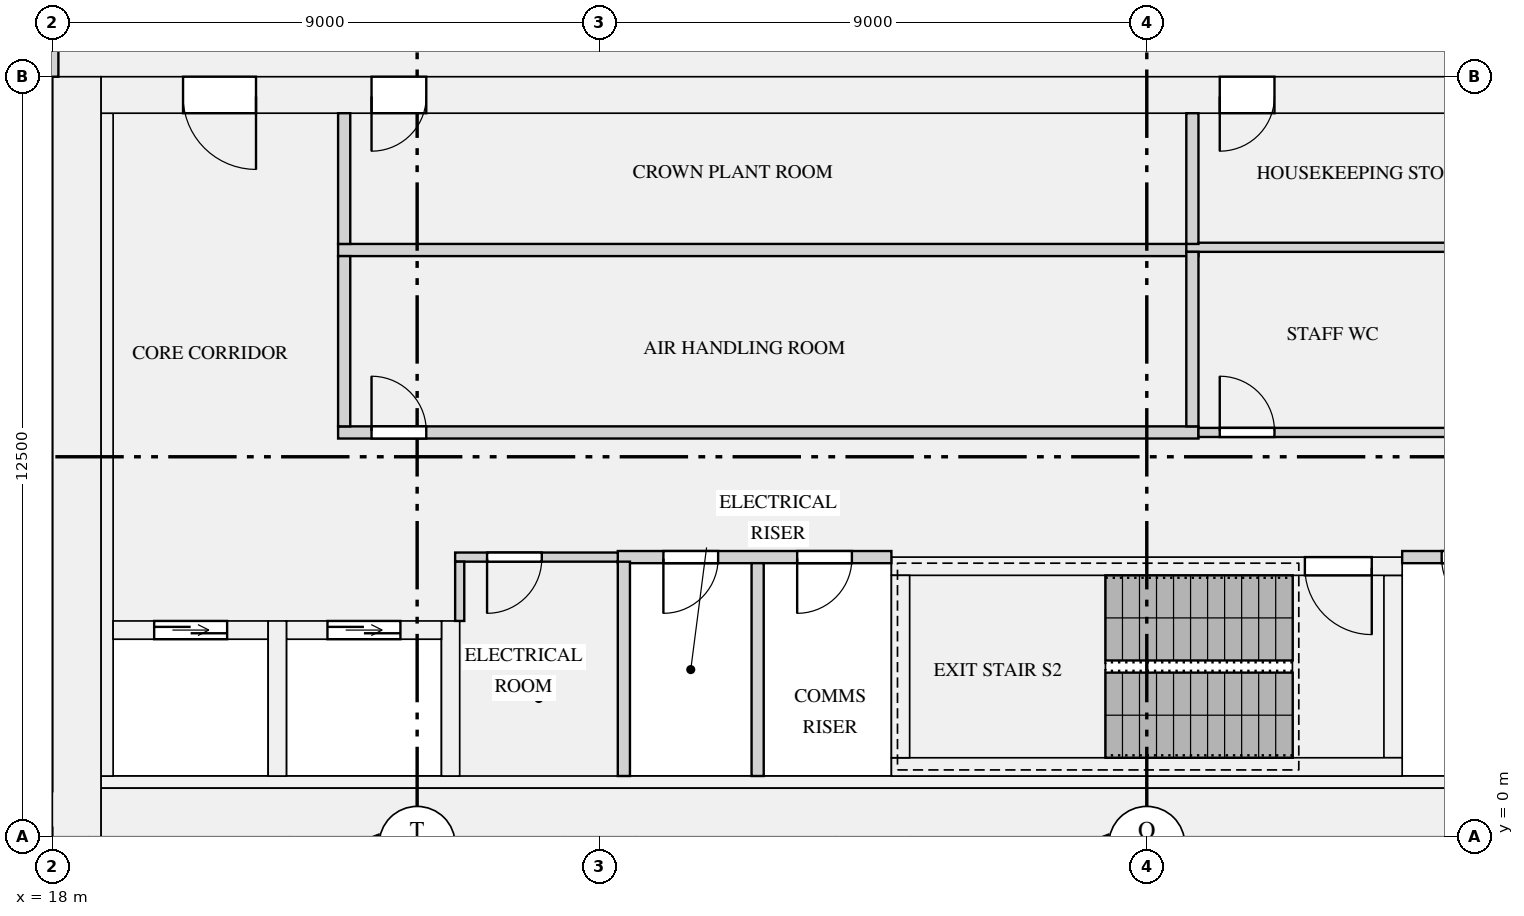
"""IFC4 building model, lengths in metres.
Left out: names, types, materials, properties, quantities, classifications, styles, units other than length and angle.
Written with IfcOpenShell. Run it as: python <this file> out.ifc"""

import sys

from ifc_helpers import new_model, si_unit, direction, frame, frame_2d, origin, place, context, subcontext, project, spatial, rectangle, extrude, element, fill, save


model = new_model("IFC4")
c1 = context("Model", 3, precision=1e-05, world=origin(), true_north=direction((0.0, 1.0)))
c2 = subcontext(c1, "Body", "Model", "MODEL_VIEW")
j1 = project(units=[si_unit("LENGTHUNIT", "METRE"), si_unit("PLANEANGLEUNIT", "RADIAN")], contexts=[c1])
p1 = place(None, origin())
s1 = spatial("IfcSite", under=j1, at=p1, CompositionType="ELEMENT")
p2 = place(p1, origin())
s2 = spatial("IfcBuilding", under=s1, at=p2, CompositionType="ELEMENT")
p3 = place(p2, frame((0.0, 0.0, 137.1)))
s3 = spatial("IfcBuildingStorey", under=s2, at=p3, CompositionType="ELEMENT", Elevation=137.1)
p4 = place(p3, frame((18.4, 0.0, 0.0), z_axis=(0.0, 0.0, 1.0), x_axis=(0.0, 1.0, 0.0)))
e1 = element("IfcWall", 1, at=p4, inside=s3, PredefinedType="SHEAR", context=c2, shape_type="SweptSolid", body=[
    extrude(rectangle(XDim=12.5, YDim=0.8, at=frame_2d((6.25, 0.0))), origin(), (0.0, 0.0, 1.0), 4.2),
])
p5 = place(p3, frame((18.8, 0.4, 0.0), z_axis=(0.0, 0.0, 1.0), x_axis=(1.0, 0.0, 0.0)))
e2 = element("IfcWall", 2, at=p5, inside=s3, PredefinedType="SHEAR", context=c2, shape_type="SweptSolid", body=[
    extrude(rectangle(XDim=34.4, YDim=0.8, at=frame_2d((17.2, 0.0))), origin(), (0.0, 0.0, 1.0), 4.2),
])
p6 = place(p3, frame((18.8, 12.2, 0.0), z_axis=(0.0, 0.0, 1.0), x_axis=(1.0, 0.0, 0.0)))
e3 = element("IfcWall", 3, at=p6, inside=s3, PredefinedType="SHEAR", context=c2, shape_type="SweptSolid", body=[
    extrude(rectangle(XDim=34.4, YDim=0.6, at=frame_2d((17.2, 0.0))), origin(), (0.0, 0.0, 1.0), 4.2),
])
p7 = place(p6, frame((24.375, 0.0, 0.0)))
e4 = element("IfcOpeningElement", 4, at=p7, cuts=e3, PredefinedType="OPENING", context=c2, shape_type="SweptSolid", body=[
    extrude(rectangle(XDim=1.1, YDim=2.1, at=frame_2d((0.55, 1.05))), frame((0.0, 0.31, 0.0), z_axis=(0.0, -1.0, 0.0), x_axis=(1.0, 0.0, 0.0)), (0.0, 0.0, 1.0), 0.62),
])
p8 = place(p6, frame((26.625, 0.0, 0.0)))
e5 = element("IfcOpeningElement", 5, at=p8, cuts=e3, PredefinedType="OPENING", context=c2, shape_type="SweptSolid", body=[
    extrude(rectangle(XDim=1.1, YDim=2.1, at=frame_2d((0.55, 1.05))), frame((0.0, 0.31, 0.0), z_axis=(0.0, -1.0, 0.0), x_axis=(1.0, 0.0, 0.0)), (0.0, 0.0, 1.0), 0.62),
])
p9 = place(p6, frame((28.875, 0.0, 0.0)))
e6 = element("IfcOpeningElement", 6, at=p9, cuts=e3, PredefinedType="OPENING", context=c2, shape_type="SweptSolid", body=[
    extrude(rectangle(XDim=1.1, YDim=2.1, at=frame_2d((0.55, 1.05))), frame((0.0, 0.31, 0.0), z_axis=(0.0, -1.0, 0.0), x_axis=(1.0, 0.0, 0.0)), (0.0, 0.0, 1.0), 0.62),
])
p10 = place(p6, frame((18.4, 0.0, 0.0)))
e7 = element("IfcOpeningElement", 7, at=p10, cuts=e3, PredefinedType="OPENING", context=c2, shape_type="SweptSolid", body=[
    extrude(rectangle(XDim=0.9, YDim=2.1, at=frame_2d((0.45, 1.05))), frame((0.0, 0.31, 0.0), z_axis=(0.0, -1.0, 0.0), x_axis=(1.0, 0.0, 0.0)), (0.0, 0.0, 1.0), 0.62),
])
p11 = place(p6, frame((4.45, 0.0, 0.0)))
e8 = element("IfcOpeningElement", 8, at=p11, cuts=e3, PredefinedType="OPENING", context=c2, shape_type="SweptSolid", body=[
    extrude(rectangle(XDim=0.9, YDim=2.1, at=frame_2d((0.45, 1.05))), frame((0.0, 0.31, 0.0), z_axis=(0.0, -1.0, 0.0), x_axis=(1.0, 0.0, 0.0)), (0.0, 0.0, 1.0), 0.62),
])
p12 = place(p6, frame((1.35, 0.0, 0.0)))
e9 = element("IfcOpeningElement", 9, at=p12, cuts=e3, PredefinedType="OPENING", context=c2, shape_type="SweptSolid", body=[
    extrude(rectangle(XDim=1.2, YDim=2.1, at=frame_2d((0.6, 1.05))), frame((0.0, 0.31, 0.0), z_axis=(0.0, -1.0, 0.0), x_axis=(1.0, 0.0, 0.0)), (0.0, 0.0, 1.0), 0.62),
])
p13 = place(p6, frame((31.85, 0.0, 0.0)))
e10 = element("IfcOpeningElement", 10, at=p13, cuts=e3, PredefinedType="OPENING", context=c2, shape_type="SweptSolid", body=[
    extrude(rectangle(XDim=1.2, YDim=2.1, at=frame_2d((0.6, 1.05))), frame((0.0, 0.31, 0.0), z_axis=(0.0, -1.0, 0.0), x_axis=(1.0, 0.0, 0.0)), (0.0, 0.0, 1.0), 0.62),
])
p14 = place(p3, frame((18.9, 1.0, 0.0), z_axis=(0.0, 0.0, 1.0), x_axis=(0.0, 1.0, 0.0)))
e11 = element("IfcWall", 11, at=p14, inside=s3, PredefinedType="SHEAR", context=c2, shape_type="SweptSolid", body=[
    extrude(rectangle(XDim=10.9, YDim=0.2, at=frame_2d((5.45, 0.0))), origin(), (0.0, 0.0, 1.0), 4.2),
])
p15 = place(p3, frame((18.8, 0.9, 0.0), z_axis=(0.0, 0.0, 1.0), x_axis=(1.0, 0.0, 0.0)))
e12 = element("IfcWall", 12, at=p15, inside=s3, PredefinedType="SHEAR", context=c2, shape_type="SweptSolid", body=[
    extrude(rectangle(XDim=34.4, YDim=0.2, at=frame_2d((17.2, 0.0))), origin(), (0.0, 0.0, 1.0), 4.2),
])
p16 = place(p3, frame((19.0, 3.4, 0.0), z_axis=(0.0, 0.0, 1.0), x_axis=(1.0, 0.0, 0.0)))
e13 = element("IfcWall", 13, at=p16, inside=s3, PredefinedType="SHEAR", context=c2, shape_type="SweptSolid", body=[
    extrude(rectangle(XDim=2.55, YDim=0.3, at=frame_2d((1.275, 0.0))), origin(), (0.0, 0.0, 1.0), 4.2),
])
p17 = place(p16, frame((0.675, 0.0, 0.0)))
e14 = element("IfcOpeningElement", 14, at=p17, cuts=e13, PredefinedType="OPENING", context=c2, shape_type="SweptSolid", body=[
    extrude(rectangle(XDim=1.2, YDim=2.1, at=frame_2d((0.6, 1.05))), frame((0.0, 0.16, 0.0), z_axis=(0.0, -1.0, 0.0), x_axis=(1.0, 0.0, 0.0)), (0.0, 0.0, 1.0), 0.32),
])
p18 = place(p3, frame((21.85, 3.4, 0.0), z_axis=(0.0, 0.0, 1.0), x_axis=(1.0, 0.0, 0.0)))
e15 = element("IfcWall", 15, at=p18, inside=s3, PredefinedType="SHEAR", context=c2, shape_type="SweptSolid", body=[
    extrude(rectangle(XDim=2.55, YDim=0.3, at=frame_2d((1.275, 0.0))), origin(), (0.0, 0.0, 1.0), 4.2),
])
p19 = place(p18, frame((0.675, 0.0, 0.0)))
e16 = element("IfcOpeningElement", 16, at=p19, cuts=e15, PredefinedType="OPENING", context=c2, shape_type="SweptSolid", body=[
    extrude(rectangle(XDim=1.2, YDim=2.1, at=frame_2d((0.6, 1.05))), frame((0.0, 0.16, 0.0), z_axis=(0.0, -1.0, 0.0), x_axis=(1.0, 0.0, 0.0)), (0.0, 0.0, 1.0), 0.32),
])
for number, where, z_axis, x_axis in (
    (17, (21.7, 1.0, 0.0), (0.0, 0.0, 1.0), (0.0, 1.0, 0.0)),
    (18, (24.55, 1.0, 0.0), (0.0, 0.0, 1.0), (0.0, 1.0, 0.0)),
):
    element("IfcWall", number, at=place(p3, frame(where, z_axis=z_axis, x_axis=x_axis)), inside=s3, PredefinedType="SHEAR", context=c2, shape_type="SweptSolid", body=[
        extrude(rectangle(XDim=2.55, YDim=0.3, at=frame_2d((1.275, 0.0))), origin(), (0.0, 0.0, 1.0), 4.2),
    ])
p20 = place(p3, frame((31.8, 1.15, 0.0), z_axis=(0.0, 0.0, 1.0), x_axis=(1.0, 0.0, 0.0)))
e19 = element("IfcWall", 19, at=p20, inside=s3, PredefinedType="SHEAR", context=c2, shape_type="SweptSolid", body=[
    extrude(rectangle(XDim=8.4, YDim=0.3, at=frame_2d((4.2, 0.0))), origin(), (0.0, 0.0, 1.0), 4.2),
])
p21 = place(p3, frame((31.8, 4.45, 0.0), z_axis=(0.0, 0.0, 1.0), x_axis=(1.0, 0.0, 0.0)))
e20 = element("IfcWall", 20, at=p21, inside=s3, PredefinedType="SHEAR", context=c2, shape_type="SweptSolid", body=[
    extrude(rectangle(XDim=8.4, YDim=0.3, at=frame_2d((4.2, 0.0))), origin(), (0.0, 0.0, 1.0), 4.2),
])
p22 = place(p21, frame((6.8, 0.0, 0.0)))
e21 = element("IfcOpeningElement", 21, at=p22, cuts=e20, PredefinedType="OPENING", context=c2, shape_type="SweptSolid", body=[
    extrude(rectangle(XDim=1.1, YDim=2.1, at=frame_2d((0.55, 1.05))), frame((0.0, 0.16, 0.0), z_axis=(0.0, -1.0, 0.0), x_axis=(1.0, 0.0, 0.0)), (0.0, 0.0, 1.0), 0.32),
])
for number, where, z_axis, x_axis in (
    (22, (31.95, 1.3, 0.0), (0.0, 0.0, 1.0), (0.0, 1.0, 0.0)),
    (23, (40.05, 1.3, 0.0), (0.0, 0.0, 1.0), (0.0, 1.0, 0.0)),
):
    element("IfcWall", number, at=place(p3, frame(where, z_axis=z_axis, x_axis=x_axis)), inside=s3, PredefinedType="SHEAR", context=c2, shape_type="SweptSolid", body=[
        extrude(rectangle(XDim=3.0, YDim=0.3, at=frame_2d((1.5, 0.0))), origin(), (0.0, 0.0, 1.0), 4.2),
    ])
p23 = place(p3, frame((27.3, 4.6, 0.0), z_axis=(0.0, 0.0, 1.0), x_axis=(1.0, 0.0, 0.0)))
e24 = element("IfcWall", 24, at=p23, inside=s3, PredefinedType="PARTITIONING", context=c2, shape_type="SweptSolid", body=[
    extrude(rectangle(XDim=4.5, YDim=0.2, at=frame_2d((2.25, 0.0))), origin(), (0.0, 0.0, 1.0), 3.7),
])
p24 = place(p23, frame((0.75, 0.0, 0.0)))
e25 = element("IfcOpeningElement", 25, at=p24, cuts=e24, PredefinedType="OPENING", context=c2, shape_type="SweptSolid", body=[
    extrude(rectangle(XDim=0.9, YDim=2.1, at=frame_2d((0.45, 1.05))), frame((0.0, 0.11, 0.0), z_axis=(0.0, -1.0, 0.0), x_axis=(1.0, 0.0, 0.0)), (0.0, 0.0, 1.0), 0.22),
])
p25 = place(p23, frame((2.95, 0.0, 0.0)))
e26 = element("IfcOpeningElement", 26, at=p25, cuts=e24, PredefinedType="OPENING", context=c2, shape_type="SweptSolid", body=[
    extrude(rectangle(XDim=0.9, YDim=2.1, at=frame_2d((0.45, 1.05))), frame((0.0, 0.11, 0.0), z_axis=(0.0, -1.0, 0.0), x_axis=(1.0, 0.0, 0.0)), (0.0, 0.0, 1.0), 0.22),
])
p26 = place(p3, frame((40.2, 4.6, 0.0), z_axis=(0.0, 0.0, 1.0), x_axis=(1.0, 0.0, 0.0)))
e27 = element("IfcWall", 27, at=p26, inside=s3, PredefinedType="PARTITIONING", context=c2, shape_type="SweptSolid", body=[
    extrude(rectangle(XDim=4.5, YDim=0.2, at=frame_2d((2.25, 0.0))), origin(), (0.0, 0.0, 1.0), 3.7),
])
p27 = place(p26, frame((0.65, 0.0, 0.0)))
e28 = element("IfcOpeningElement", 28, at=p27, cuts=e27, PredefinedType="OPENING", context=c2, shape_type="SweptSolid", body=[
    extrude(rectangle(XDim=0.9, YDim=2.1, at=frame_2d((0.45, 1.05))), frame((0.0, 0.11, 0.0), z_axis=(0.0, -1.0, 0.0), x_axis=(1.0, 0.0, 0.0)), (0.0, 0.0, 1.0), 0.22),
])
p28 = place(p26, frame((2.85, 0.0, 0.0)))
e29 = element("IfcOpeningElement", 29, at=p28, cuts=e27, PredefinedType="OPENING", context=c2, shape_type="SweptSolid", body=[
    extrude(rectangle(XDim=0.9, YDim=2.1, at=frame_2d((0.45, 1.05))), frame((0.0, 0.11, 0.0), z_axis=(0.0, -1.0, 0.0), x_axis=(1.0, 0.0, 0.0)), (0.0, 0.0, 1.0), 0.22),
])
p29 = place(p3, frame((24.625, 4.6, 0.0), z_axis=(0.0, 0.0, 1.0), x_axis=(1.0, 0.0, 0.0)))
e30 = element("IfcWall", 30, at=p29, inside=s3, PredefinedType="PARTITIONING", context=c2, shape_type="SweptSolid", body=[
    extrude(rectangle(XDim=2.675, YDim=0.15, at=frame_2d((1.337, 0.0))), origin(), (0.0, 0.0, 1.0), 3.7),
])
p30 = place(p29, frame((0.525, 0.0, 0.0)))
e31 = element("IfcOpeningElement", 31, at=p30, cuts=e30, PredefinedType="OPENING", context=c2, shape_type="SweptSolid", body=[
    extrude(rectangle(XDim=0.9, YDim=2.1, at=frame_2d((0.45, 1.05))), frame((0.0, 0.085, 0.0), z_axis=(0.0, -1.0, 0.0), x_axis=(1.0, 0.0, 0.0)), (0.0, 0.0, 1.0), 0.17),
])
p31 = place(p3, frame((22.7, 6.65, 0.0), z_axis=(0.0, 0.0, 1.0), x_axis=(1.0, 0.0, 0.0)))
e32 = element("IfcWall", 32, at=p31, inside=s3, PredefinedType="PARTITIONING", context=c2, shape_type="SweptSolid", body=[
    extrude(rectangle(XDim=14.15, YDim=0.2, at=frame_2d((7.075, 0.0))), origin(), (0.0, 0.0, 1.0), 3.7),
])
p32 = place(p31, frame((0.55, 0.0, 0.0)))
e33 = element("IfcOpeningElement", 33, at=p32, cuts=e32, PredefinedType="OPENING", context=c2, shape_type="SweptSolid", body=[
    extrude(rectangle(XDim=0.9, YDim=2.1, at=frame_2d((0.45, 1.05))), frame((0.0, 0.11, 0.0), z_axis=(0.0, -1.0, 0.0), x_axis=(1.0, 0.0, 0.0)), (0.0, 0.0, 1.0), 0.22),
])
p33 = place(p3, frame((36.85, 6.65, 0.0), z_axis=(0.0, 0.0, 1.0), x_axis=(1.0, 0.0, 0.0)))
e34 = element("IfcWall", 34, at=p33, inside=s3, PredefinedType="PARTITIONING", context=c2, shape_type="SweptSolid", body=[
    extrude(rectangle(XDim=5.675, YDim=0.15, at=frame_2d((2.837, 0.0))), origin(), (0.0, 0.0, 1.0), 3.7),
])
p34 = place(p33, frame((0.35, 0.0, 0.0)))
e35 = element("IfcOpeningElement", 35, at=p34, cuts=e34, PredefinedType="OPENING", context=c2, shape_type="SweptSolid", body=[
    extrude(rectangle(XDim=0.9, YDim=2.1, at=frame_2d((0.45, 1.05))), frame((0.0, 0.085, 0.0), z_axis=(0.0, -1.0, 0.0), x_axis=(1.0, 0.0, 0.0)), (0.0, 0.0, 1.0), 0.17),
])
p35 = place(p3, frame((22.7, 9.65, 0.0), z_axis=(0.0, 0.0, 1.0), x_axis=(1.0, 0.0, 0.0)))
e36 = element("IfcWall", 36, at=p35, inside=s3, PredefinedType="PARTITIONING", context=c2, shape_type="SweptSolid", body=[
    extrude(rectangle(XDim=14.15, YDim=0.2, at=frame_2d((7.075, 0.0))), origin(), (0.0, 0.0, 1.0), 3.7),
])
p36 = place(p3, frame((36.65, 9.695, 0.0), z_axis=(0.0, 0.0, 1.0), x_axis=(1.0, 0.0, 0.0)))
e37 = element("IfcWall", 37, at=p36, inside=s3, PredefinedType="PARTITIONING", context=c2, shape_type="SweptSolid", body=[
    extrude(rectangle(XDim=5.8, YDim=0.15, at=frame_2d((2.9, 0.0))), origin(), (0.0, 0.0, 1.0), 3.7),
])
p37 = place(p3, frame((27.4, 1.0, 0.0), z_axis=(0.0, 0.0, 1.0), x_axis=(0.0, 1.0, 0.0)))
e38 = element("IfcWall", 38, at=p37, inside=s3, PredefinedType="PARTITIONING", context=c2, shape_type="SweptSolid", body=[
    extrude(rectangle(XDim=3.525, YDim=0.2, at=frame_2d((1.762, 0.0))), origin(), (0.0, 0.0, 1.0), 3.7),
])
p38 = place(p3, frame((29.6, 1.0, 0.0), z_axis=(0.0, 0.0, 1.0), x_axis=(0.0, 1.0, 0.0)))
e39 = element("IfcWall", 39, at=p38, inside=s3, PredefinedType="PARTITIONING", context=c2, shape_type="SweptSolid", body=[
    extrude(rectangle(XDim=3.5, YDim=0.2, at=frame_2d((1.75, 0.0))), origin(), (0.0, 0.0, 1.0), 3.7),
])
p39 = place(p3, frame((24.7, 3.55, 0.0), z_axis=(0.0, 0.0, 1.0), x_axis=(0.0, 1.0, 0.0)))
e40 = element("IfcWall", 40, at=p39, inside=s3, PredefinedType="PARTITIONING", context=c2, shape_type="SweptSolid", body=[
    extrude(rectangle(XDim=0.975, YDim=0.15, at=frame_2d((0.487, 0.0))), origin(), (0.0, 0.0, 1.0), 3.7),
])
p40 = place(p3, frame((22.8, 6.75, 0.0), z_axis=(0.0, 0.0, 1.0), x_axis=(0.0, 1.0, 0.0)))
e41 = element("IfcWall", 41, at=p40, inside=s3, PredefinedType="PARTITIONING", context=c2, shape_type="SweptSolid", body=[
    extrude(rectangle(XDim=2.8, YDim=0.2, at=frame_2d((1.4, 0.0))), origin(), (0.0, 0.0, 1.0), 3.7),
])
p41 = place(p3, frame((36.75, 6.75, 0.0), z_axis=(0.0, 0.0, 1.0), x_axis=(0.0, 1.0, 0.0)))
e42 = element("IfcWall", 42, at=p41, inside=s3, PredefinedType="PARTITIONING", context=c2, shape_type="SweptSolid", body=[
    extrude(rectangle(XDim=2.87, YDim=0.2, at=frame_2d((1.435, 0.0))), origin(), (0.0, 0.0, 1.0), 3.7),
])
for number, where, z_axis, x_axis in (
    (43, (22.8, 9.75, 0.0), (0.0, 0.0, 1.0), (0.0, 1.0, 0.0)),
    (44, (36.75, 9.75, 0.0), (0.0, 0.0, 1.0), (0.0, 1.0, 0.0)),
):
    element("IfcWall", number, at=place(p3, frame(where, z_axis=z_axis, x_axis=x_axis)), inside=s3, PredefinedType="PARTITIONING", context=c2, shape_type="SweptSolid", body=[
        extrude(rectangle(XDim=2.15, YDim=0.2, at=frame_2d((1.075, 0.0))), origin(), (0.0, 0.0, 1.0), 3.7),
    ])
p42 = place(p3, frame((18.0, 12.5, 0.0), z_axis=(0.0, 0.0, 1.0), x_axis=(0.0, 1.0, 0.0)))
e45 = element("IfcWall", 45, at=p42, inside=s3, PredefinedType="PARTITIONING", context=c2, shape_type="SweptSolid", body=[
    extrude(rectangle(XDim=3.4, YDim=0.2, at=frame_2d((1.7, 0.0))), origin(), (0.0, 0.0, 1.0), 3.7),
])
p43 = place(p17, origin())
e46 = element("IfcDoor", 46, at=p43, inside=s3, OperationType="DOUBLE_DOOR_SLIDING", PredefinedType="DOOR", context=c2, shape_type="SweptSolid", body=[
    extrude(rectangle(XDim=1.2, YDim=2.1, at=frame_2d((0.6, 1.05))), frame((0.0, 0.025, 0.0), z_axis=(0.0, -1.0, 0.0), x_axis=(1.0, 0.0, 0.0)), (0.0, 0.0, 1.0), 0.05),
])
fill(e14, e46)
p44 = place(p19, origin())
e47 = element("IfcDoor", 47, at=p44, inside=s3, OperationType="DOUBLE_DOOR_SLIDING", PredefinedType="DOOR", context=c2, shape_type="SweptSolid", body=[
    extrude(rectangle(XDim=1.2, YDim=2.1, at=frame_2d((0.6, 1.05))), frame((0.0, 0.025, 0.0), z_axis=(0.0, -1.0, 0.0), x_axis=(1.0, 0.0, 0.0)), (0.0, 0.0, 1.0), 0.05),
])
fill(e16, e47)
p45 = place(p22, frame((1.1, 0.0, 0.0), z_axis=(0.0, 0.0, 1.0), x_axis=(-1.0, 0.0, 0.0)))
e48 = element("IfcDoor", 48, at=p45, inside=s3, OperationType="SINGLE_SWING_LEFT", PredefinedType="DOOR", context=c2, shape_type="SweptSolid", body=[
    extrude(rectangle(XDim=1.1, YDim=2.1, at=frame_2d((0.55, 1.05))), frame((0.0, 0.025, 0.0), z_axis=(0.0, -1.0, 0.0), x_axis=(1.0, 0.0, 0.0)), (0.0, 0.0, 1.0), 0.05),
])
fill(e21, e48)
p46 = place(p30, frame((0.9, 0.0, 0.0), z_axis=(0.0, 0.0, 1.0), x_axis=(-1.0, 0.0, 0.0)))
e49 = element("IfcDoor", 49, at=p46, inside=s3, OperationType="SINGLE_SWING_RIGHT", PredefinedType="DOOR", context=c2, shape_type="SweptSolid", body=[
    extrude(rectangle(XDim=0.9, YDim=2.1, at=frame_2d((0.45, 1.05))), frame((0.0, 0.025, 0.0), z_axis=(0.0, -1.0, 0.0), x_axis=(1.0, 0.0, 0.0)), (0.0, 0.0, 1.0), 0.05),
])
fill(e31, e49)
p47 = place(p34, origin())
e50 = element("IfcDoor", 50, at=p47, inside=s3, OperationType="SINGLE_SWING_LEFT", PredefinedType="DOOR", context=c2, shape_type="SweptSolid", body=[
    extrude(rectangle(XDim=0.9, YDim=2.1, at=frame_2d((0.45, 1.05))), frame((0.0, 0.025, 0.0), z_axis=(0.0, -1.0, 0.0), x_axis=(1.0, 0.0, 0.0)), (0.0, 0.0, 1.0), 0.05),
])
fill(e35, e50)
p48 = place(p10, frame((0.9, 0.0, 0.0), z_axis=(0.0, 0.0, 1.0), x_axis=(-1.0, 0.0, 0.0)))
e51 = element("IfcDoor", 51, at=p48, inside=s3, OperationType="SINGLE_SWING_RIGHT", PredefinedType="DOOR", context=c2, shape_type="SweptSolid", body=[
    extrude(rectangle(XDim=0.9, YDim=2.1, at=frame_2d((0.45, 1.05))), frame((0.0, 0.025, 0.0), z_axis=(0.0, -1.0, 0.0), x_axis=(1.0, 0.0, 0.0)), (0.0, 0.0, 1.0), 0.05),
])
fill(e7, e51)
p49 = place(p11, frame((0.9, 0.0, 0.0), z_axis=(0.0, 0.0, 1.0), x_axis=(-1.0, 0.0, 0.0)))
e52 = element("IfcDoor", 52, at=p49, inside=s3, OperationType="SINGLE_SWING_RIGHT", PredefinedType="DOOR", context=c2, shape_type="SweptSolid", body=[
    extrude(rectangle(XDim=0.9, YDim=2.1, at=frame_2d((0.45, 1.05))), frame((0.0, 0.025, 0.0), z_axis=(0.0, -1.0, 0.0), x_axis=(1.0, 0.0, 0.0)), (0.0, 0.0, 1.0), 0.05),
])
fill(e8, e52)
p50 = place(p32, origin())
e53 = element("IfcDoor", 53, at=p50, inside=s3, OperationType="SINGLE_SWING_LEFT", PredefinedType="DOOR", context=c2, shape_type="SweptSolid", body=[
    extrude(rectangle(XDim=0.9, YDim=2.1, at=frame_2d((0.45, 1.05))), frame((0.0, 0.025, 0.0), z_axis=(0.0, -1.0, 0.0), x_axis=(1.0, 0.0, 0.0)), (0.0, 0.0, 1.0), 0.05),
])
fill(e33, e53)
p51 = place(p24, frame((0.9, 0.0, 0.0), z_axis=(0.0, 0.0, 1.0), x_axis=(-1.0, 0.0, 0.0)))
e54 = element("IfcDoor", 54, at=p51, inside=s3, OperationType="SINGLE_SWING_RIGHT", PredefinedType="DOOR", context=c2, shape_type="SweptSolid", body=[
    extrude(rectangle(XDim=0.9, YDim=2.1, at=frame_2d((0.45, 1.05))), frame((0.0, 0.025, 0.0), z_axis=(0.0, -1.0, 0.0), x_axis=(1.0, 0.0, 0.0)), (0.0, 0.0, 1.0), 0.05),
])
fill(e25, e54)
p52 = place(p25, frame((0.9, 0.0, 0.0), z_axis=(0.0, 0.0, 1.0), x_axis=(-1.0, 0.0, 0.0)))
e55 = element("IfcDoor", 55, at=p52, inside=s3, OperationType="SINGLE_SWING_RIGHT", PredefinedType="DOOR", context=c2, shape_type="SweptSolid", body=[
    extrude(rectangle(XDim=0.9, YDim=2.1, at=frame_2d((0.45, 1.05))), frame((0.0, 0.025, 0.0), z_axis=(0.0, -1.0, 0.0), x_axis=(1.0, 0.0, 0.0)), (0.0, 0.0, 1.0), 0.05),
])
fill(e26, e55)
p53 = place(p27, frame((0.9, 0.0, 0.0), z_axis=(0.0, 0.0, 1.0), x_axis=(-1.0, 0.0, 0.0)))
e56 = element("IfcDoor", 56, at=p53, inside=s3, OperationType="SINGLE_SWING_LEFT", PredefinedType="DOOR", context=c2, shape_type="SweptSolid", body=[
    extrude(rectangle(XDim=0.9, YDim=2.1, at=frame_2d((0.45, 1.05))), frame((0.0, 0.025, 0.0), z_axis=(0.0, -1.0, 0.0), x_axis=(1.0, 0.0, 0.0)), (0.0, 0.0, 1.0), 0.05),
])
fill(e28, e56)
p54 = place(p12, frame((1.2, 0.0, 0.0), z_axis=(0.0, 0.0, 1.0), x_axis=(-1.0, 0.0, 0.0)))
e57 = element("IfcDoor", 57, at=p54, inside=s3, OperationType="SINGLE_SWING_LEFT", PredefinedType="DOOR", context=c2, shape_type="SweptSolid", body=[
    extrude(rectangle(XDim=1.2, YDim=2.1, at=frame_2d((0.6, 1.05))), frame((0.0, 0.025, 0.0), z_axis=(0.0, -1.0, 0.0), x_axis=(1.0, 0.0, 0.0)), (0.0, 0.0, 1.0), 0.05),
])
fill(e9, e57)
save(model, sys.argv[1])
